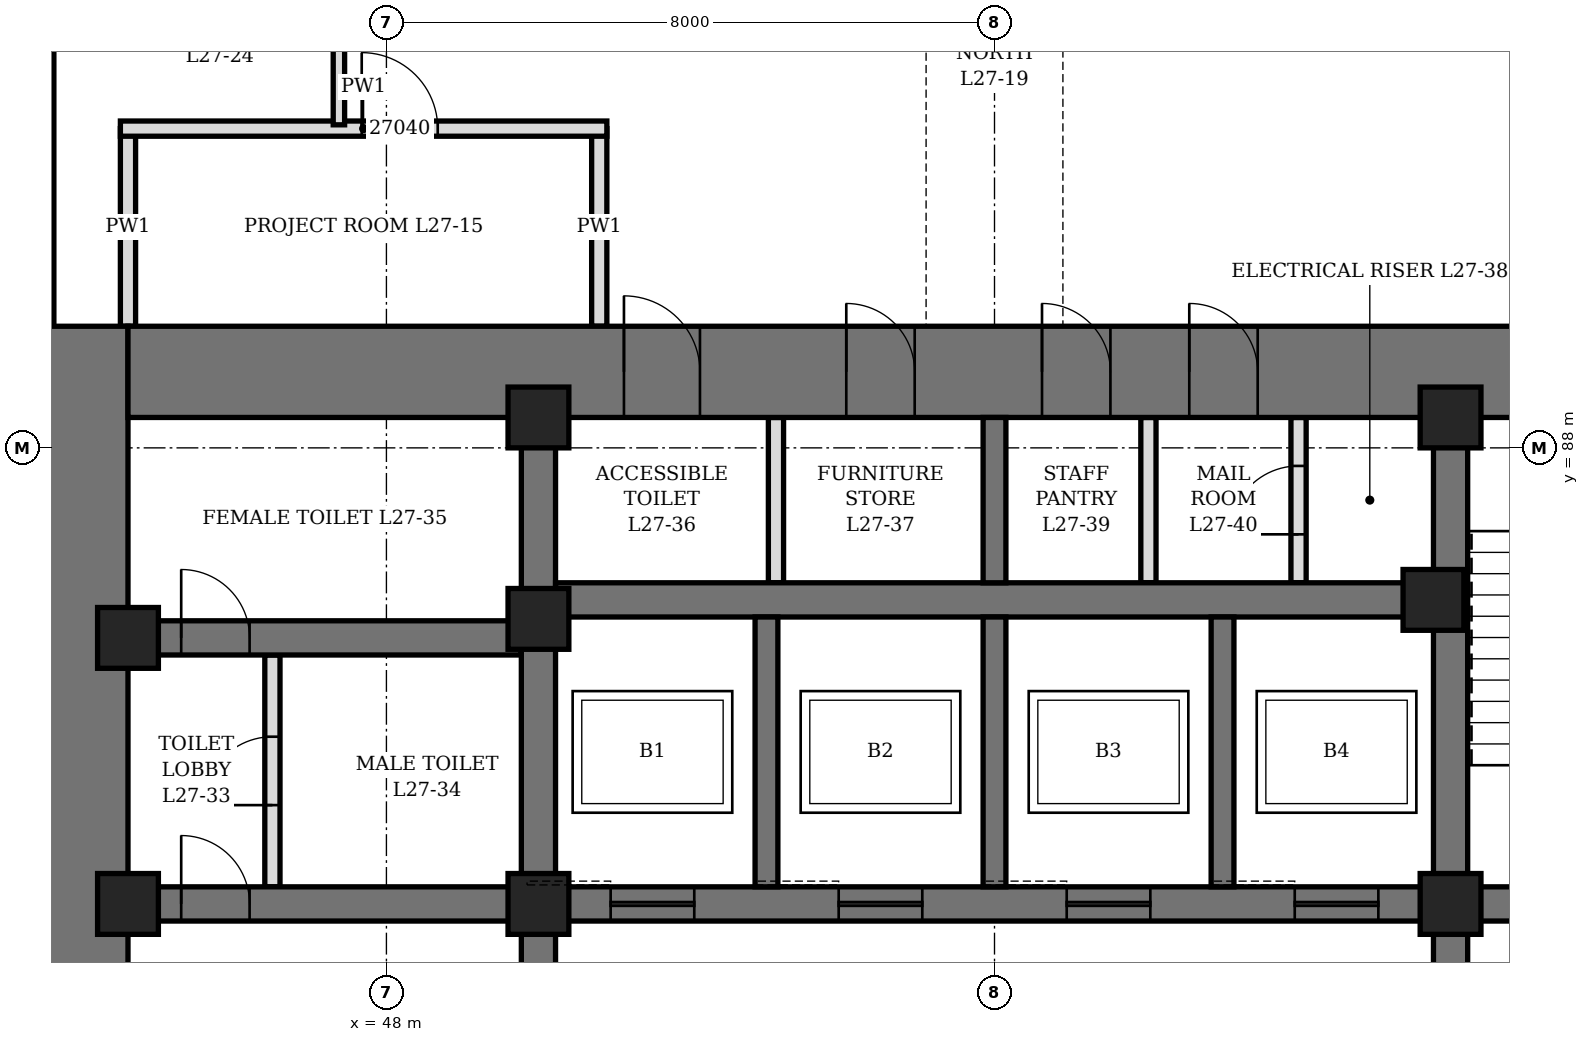
"""IFC4 building model, lengths in metres.
Left out: names, types, materials, properties, quantities, classifications, styles, units other than length and angle.
Written with IfcOpenShell. Run it as: python <this file> out.ifc"""

import sys

from ifc_helpers import new_model, si_unit, direction, frame, frame_2d, origin, origin_2d, place, context, subcontext, project, spatial, rectangle, hollow_rectangle, extrude, element, fill, save


model = new_model("IFC4")
c1 = context("Model", 3, precision=1e-05, world=origin(), true_north=direction((0.0, 1.0)))
c2 = subcontext(c1, "Body", "Model", "MODEL_VIEW")
j1 = project(units=[si_unit("LENGTHUNIT", "METRE"), si_unit("PLANEANGLEUNIT", "RADIAN")], contexts=[c1])
p1 = place(None, origin())
s1 = spatial("IfcSite", under=j1, at=p1, CompositionType="ELEMENT")
p2 = place(p1, origin())
s2 = spatial("IfcBuilding", under=s1, at=p2, CompositionType="ELEMENT")
p3 = place(p2, frame((0.0, 0.0, 124.9)))
s3 = spatial("IfcBuildingStorey", under=s2, at=p3, CompositionType="ELEMENT", Elevation=124.9)
p4 = place(p3, frame((44.0, 70.4, 0.0), z_axis=(0.0, 0.0, 1.0), x_axis=(0.0, 1.0, 0.0)))
e1 = element("IfcWall", 1, at=p4, inside=s3, PredefinedType="SHEAR", context=c2, shape_type="SweptSolid", body=[
    extrude(rectangle(XDim=19.2, YDim=1.2, at=frame_2d((9.6, 0.0))), origin(), (0.0, 0.0, 1.0), 4.2),
])
p5 = place(p4, frame((8.6, 0.0, 0.0)))
e2 = element("IfcOpeningElement", 2, at=p5, cuts=e1, PredefinedType="OPENING", context=c2, shape_type="SweptSolid", body=[
    extrude(rectangle(XDim=2.0, YDim=2.4, at=frame_2d((1.0, 1.2))), frame((0.0, 0.61, 0.0), z_axis=(0.0, -1.0, 0.0), x_axis=(1.0, 0.0, 0.0)), (0.0, 0.0, 1.0), 1.22),
])
p6 = place(p3, frame((44.6, 89.0, 0.0), z_axis=(0.0, 0.0, 1.0), x_axis=(1.0, 0.0, 0.0)))
e3 = element("IfcWall", 3, at=p6, inside=s3, PredefinedType="SHEAR", context=c2, shape_type="SweptSolid", body=[
    extrude(rectangle(XDim=22.8, YDim=1.2, at=frame_2d((11.4, 0.0))), origin(), (0.0, 0.0, 1.0), 4.2),
])
p7 = place(p6, frame((6.525, 0.0, 0.0)))
e4 = element("IfcOpeningElement", 4, at=p7, cuts=e3, PredefinedType="OPENING", context=c2, shape_type="SweptSolid", body=[
    extrude(rectangle(XDim=1.0, YDim=2.1, at=frame_2d((0.5, 1.05))), frame((0.0, 0.61, 0.0), z_axis=(0.0, -1.0, 0.0), x_axis=(1.0, 0.0, 0.0)), (0.0, 0.0, 1.0), 1.22),
])
p8 = place(p6, frame((9.45, 0.0, 0.0)))
e5 = element("IfcOpeningElement", 5, at=p8, cuts=e3, PredefinedType="OPENING", context=c2, shape_type="SweptSolid", body=[
    extrude(rectangle(XDim=0.9, YDim=2.1, at=frame_2d((0.45, 1.05))), frame((0.0, 0.61, 0.0), z_axis=(0.0, -1.0, 0.0), x_axis=(1.0, 0.0, 0.0)), (0.0, 0.0, 1.0), 1.22),
])
p9 = place(p6, frame((12.025, 0.0, 0.0)))
e6 = element("IfcOpeningElement", 6, at=p9, cuts=e3, PredefinedType="OPENING", context=c2, shape_type="SweptSolid", body=[
    extrude(rectangle(XDim=0.9, YDim=2.1, at=frame_2d((0.45, 1.05))), frame((0.0, 0.61, 0.0), z_axis=(0.0, -1.0, 0.0), x_axis=(1.0, 0.0, 0.0)), (0.0, 0.0, 1.0), 1.22),
])
p10 = place(p6, frame((13.962, 0.0, 0.0)))
e7 = element("IfcOpeningElement", 7, at=p10, cuts=e3, PredefinedType="OPENING", context=c2, shape_type="SweptSolid", body=[
    extrude(rectangle(XDim=0.9, YDim=2.1, at=frame_2d((0.45, 1.05))), frame((0.0, 0.61, 0.0), z_axis=(0.0, -1.0, 0.0), x_axis=(1.0, 0.0, 0.0)), (0.0, 0.0, 1.0), 1.22),
])
p11 = place(p3, frame((50.0, 71.6, 0.0), z_axis=(0.0, 0.0, 1.0), x_axis=(0.0, 1.0, 0.0)))
e8 = element("IfcWall", 8, at=p11, inside=s3, PredefinedType="SHEAR", context=c2, shape_type="SweptSolid", body=[
    extrude(rectangle(XDim=16.8, YDim=0.45, at=frame_2d((8.4, 0.0))), origin(), (0.0, 0.0, 1.0), 4.2),
])
p12 = place(p11, frame((7.5, 0.0, 0.0)))
e9 = element("IfcOpeningElement", 9, at=p12, cuts=e8, PredefinedType="OPENING", context=c2, shape_type="SweptSolid", body=[
    extrude(rectangle(XDim=1.8, YDim=2.4, at=frame_2d((0.9, 1.2))), frame((0.0, 0.235, 0.0), z_axis=(0.0, -1.0, 0.0), x_axis=(1.0, 0.0, 0.0)), (0.0, 0.0, 1.0), 0.47),
])
p13 = place(p3, frame((62.0, 71.6, 0.0), z_axis=(0.0, 0.0, 1.0), x_axis=(0.0, 1.0, 0.0)))
e10 = element("IfcWall", 10, at=p13, inside=s3, PredefinedType="SHEAR", context=c2, shape_type="SweptSolid", body=[
    extrude(rectangle(XDim=16.8, YDim=0.45, at=frame_2d((8.4, 0.0))), origin(), (0.0, 0.0, 1.0), 4.2),
])
p14 = place(p13, frame((7.5, 0.0, 0.0)))
e11 = element("IfcOpeningElement", 11, at=p14, cuts=e10, PredefinedType="OPENING", context=c2, shape_type="SweptSolid", body=[
    extrude(rectangle(XDim=1.8, YDim=2.4, at=frame_2d((0.9, 1.2))), frame((0.0, 0.235, 0.0), z_axis=(0.0, -1.0, 0.0), x_axis=(1.0, 0.0, 0.0)), (0.0, 0.0, 1.0), 0.47),
])
p15 = place(p3, frame((44.6, 82.0, 0.0), z_axis=(0.0, 0.0, 1.0), x_axis=(1.0, 0.0, 0.0)))
e12 = element("IfcWall", 12, at=p15, inside=s3, PredefinedType="SHEAR", context=c2, shape_type="SweptSolid", body=[
    extrude(rectangle(XDim=5.175, YDim=0.45, at=frame_2d((2.587, 0.0))), origin(), (0.0, 0.0, 1.0), 4.2),
])
p16 = place(p15, frame((0.7, 0.0, 0.0)))
e13 = element("IfcOpeningElement", 13, at=p16, cuts=e12, PredefinedType="OPENING", context=c2, shape_type="SweptSolid", body=[
    extrude(rectangle(XDim=0.9, YDim=2.1, at=frame_2d((0.45, 1.05))), frame((0.0, 0.235, 0.0), z_axis=(0.0, -1.0, 0.0), x_axis=(1.0, 0.0, 0.0)), (0.0, 0.0, 1.0), 0.47),
])
p17 = place(p3, frame((44.6, 85.5, 0.0), z_axis=(0.0, 0.0, 1.0), x_axis=(1.0, 0.0, 0.0)))
e14 = element("IfcWall", 14, at=p17, inside=s3, PredefinedType="SHEAR", context=c2, shape_type="SweptSolid", body=[
    extrude(rectangle(XDim=5.175, YDim=0.45, at=frame_2d((2.587, 0.0))), origin(), (0.0, 0.0, 1.0), 4.2),
])
p18 = place(p17, frame((0.7, 0.0, 0.0)))
e15 = element("IfcOpeningElement", 15, at=p18, cuts=e14, PredefinedType="OPENING", context=c2, shape_type="SweptSolid", body=[
    extrude(rectangle(XDim=0.9, YDim=2.1, at=frame_2d((0.45, 1.05))), frame((0.0, 0.235, 0.0), z_axis=(0.0, -1.0, 0.0), x_axis=(1.0, 0.0, 0.0)), (0.0, 0.0, 1.0), 0.47),
])
p19 = place(p3, frame((62.225, 82.0, 0.0), z_axis=(0.0, 0.0, 1.0), x_axis=(1.0, 0.0, 0.0)))
e16 = element("IfcWall", 16, at=p19, inside=s3, PredefinedType="SHEAR", context=c2, shape_type="SweptSolid", body=[
    extrude(rectangle(XDim=5.175, YDim=0.45, at=frame_2d((2.587, 0.0))), origin(), (0.0, 0.0, 1.0), 4.2),
])
p20 = place(p19, frame((2.175, 0.0, 0.0)))
e17 = element("IfcOpeningElement", 17, at=p20, cuts=e16, PredefinedType="OPENING", context=c2, shape_type="SweptSolid", body=[
    extrude(rectangle(XDim=1.2, YDim=2.1, at=frame_2d((0.6, 1.05))), frame((0.0, 0.235, 0.0), z_axis=(0.0, -1.0, 0.0), x_axis=(1.0, 0.0, 0.0)), (0.0, 0.0, 1.0), 0.47),
])
p21 = place(p3, frame((50.225, 82.0, 0.0), z_axis=(0.0, 0.0, 1.0), x_axis=(1.0, 0.0, 0.0)))
e18 = element("IfcWall", 18, at=p21, inside=s3, PredefinedType="SHEAR", context=c2, shape_type="SweptSolid", body=[
    extrude(rectangle(XDim=11.55, YDim=0.45, at=frame_2d((5.775, 0.0))), origin(), (0.0, 0.0, 1.0), 4.2),
])
p22 = place(p21, frame((0.725, 0.0, 0.0)))
e19 = element("IfcOpeningElement", 19, at=p22, cuts=e18, PredefinedType="OPENING", context=c2, shape_type="SweptSolid", body=[
    extrude(rectangle(XDim=1.1, YDim=2.2, at=frame_2d((0.55, 1.1))), frame((0.0, 0.235, 0.0), z_axis=(0.0, -1.0, 0.0), x_axis=(1.0, 0.0, 0.0)), (0.0, 0.0, 1.0), 0.47),
])
p23 = place(p21, frame((3.725, 0.0, 0.0)))
e20 = element("IfcOpeningElement", 20, at=p23, cuts=e18, PredefinedType="OPENING", context=c2, shape_type="SweptSolid", body=[
    extrude(rectangle(XDim=1.1, YDim=2.2, at=frame_2d((0.55, 1.1))), frame((0.0, 0.235, 0.0), z_axis=(0.0, -1.0, 0.0), x_axis=(1.0, 0.0, 0.0)), (0.0, 0.0, 1.0), 0.47),
])
p24 = place(p21, frame((6.725, 0.0, 0.0)))
e21 = element("IfcOpeningElement", 21, at=p24, cuts=e18, PredefinedType="OPENING", context=c2, shape_type="SweptSolid", body=[
    extrude(rectangle(XDim=1.1, YDim=2.2, at=frame_2d((0.55, 1.1))), frame((0.0, 0.235, 0.0), z_axis=(0.0, -1.0, 0.0), x_axis=(1.0, 0.0, 0.0)), (0.0, 0.0, 1.0), 0.47),
])
p25 = place(p21, frame((9.725, 0.0, 0.0)))
e22 = element("IfcOpeningElement", 22, at=p25, cuts=e18, PredefinedType="OPENING", context=c2, shape_type="SweptSolid", body=[
    extrude(rectangle(XDim=1.1, YDim=2.2, at=frame_2d((0.55, 1.1))), frame((0.0, 0.235, 0.0), z_axis=(0.0, -1.0, 0.0), x_axis=(1.0, 0.0, 0.0)), (0.0, 0.0, 1.0), 0.47),
])
p26 = place(p3, frame((50.225, 86.0, 0.0), z_axis=(0.0, 0.0, 1.0), x_axis=(1.0, 0.0, 0.0)))
e23 = element("IfcWall", 23, at=p26, inside=s3, PredefinedType="SHEAR", context=c2, shape_type="SweptSolid", body=[
    extrude(rectangle(XDim=11.55, YDim=0.45, at=frame_2d((5.775, 0.0))), origin(), (0.0, 0.0, 1.0), 4.2),
])
for number, where, z_axis, x_axis in (
    (24, (53.0, 82.225, 0.0), (0.0, 0.0, 1.0), (0.0, 1.0, 0.0)),
    (25, (56.0, 82.225, 0.0), (0.0, 0.0, 1.0), (0.0, 1.0, 0.0)),
    (26, (59.0, 82.225, 0.0), (0.0, 0.0, 1.0), (0.0, 1.0, 0.0)),
):
    element("IfcWall", number, at=place(p3, frame(where, z_axis=z_axis, x_axis=x_axis)), inside=s3, PredefinedType="SHEAR", context=c2, shape_type="SweptSolid", body=[
        extrude(rectangle(XDim=3.55, YDim=0.3, at=frame_2d((1.775, 0.0))), origin(), (0.0, 0.0, 1.0), 4.2),
    ])
p27 = place(p3, frame((56.0, 86.225, 0.0), z_axis=(0.0, 0.0, 1.0), x_axis=(0.0, 1.0, 0.0)))
e27 = element("IfcWall", 27, at=p27, inside=s3, PredefinedType="SHEAR", context=c2, shape_type="SweptSolid", body=[
    extrude(rectangle(XDim=2.175, YDim=0.3, at=frame_2d((1.087, 0.0))), origin(), (0.0, 0.0, 1.0), 4.2),
])
for number, where, z_axis, x_axis in (
    (28, (44.6, 82.0, 0.0), (0.0, 0.0, 1.0), (1.0, 0.0, 0.0)),
    (29, (44.6, 85.5, 0.0), (0.0, 0.0, 1.0), (1.0, 0.0, 0.0)),
    (30, (50.0, 82.0, 0.0), (0.0, 0.0, 1.0), (1.0, 0.0, 0.0)),
    (31, (50.0, 85.75, 0.0), (0.0, 0.0, 1.0), (1.0, 0.0, 0.0)),
    (32, (50.0, 88.4, 0.0), (0.0, 0.0, 1.0), (1.0, 0.0, 0.0)),
    (33, (61.775, 86.0, 0.0), (0.0, 0.0, 1.0), (1.0, 0.0, 0.0)),
    (34, (62.0, 82.0, 0.0), (0.0, 0.0, 1.0), (1.0, 0.0, 0.0)),
    (35, (62.0, 88.4, 0.0), (0.0, 0.0, 1.0), (1.0, 0.0, 0.0)),
):
    element("IfcColumn", number, at=place(p3, frame(where, z_axis=z_axis, x_axis=x_axis)), inside=s3, PredefinedType="COLUMN", context=c2, shape_type="SweptSolid", body=[
        extrude(hollow_rectangle(XDim=0.8, YDim=0.8, WallThickness=0.1, at=origin_2d()), origin(), (0.0, 0.0, 1.0), 4.2),
    ])
p28 = place(p3, frame((46.5, 82.225, 0.0), z_axis=(0.0, 0.0, 1.0), x_axis=(0.0, 1.0, 0.0)))
e36 = element("IfcWall", 36, at=p28, inside=s3, PredefinedType="PARTITIONING", context=c2, shape_type="SweptSolid", body=[
    extrude(rectangle(XDim=3.05, YDim=0.2, at=frame_2d((1.525, 0.0))), origin(), (0.0, 0.0, 1.0), 4.04),
])
p29 = place(p28, frame((1.075, 0.0, 0.0)))
e37 = element("IfcOpeningElement", 37, at=p29, cuts=e36, PredefinedType="OPENING", context=c2, shape_type="SweptSolid", body=[
    extrude(rectangle(XDim=0.9, YDim=2.1, at=frame_2d((0.45, 1.05))), frame((0.0, 0.11, 0.0), z_axis=(0.0, -1.0, 0.0), x_axis=(1.0, 0.0, 0.0)), (0.0, 0.0, 1.0), 0.22),
])
p30 = place(p3, frame((53.125, 86.225, 0.0), z_axis=(0.0, 0.0, 1.0), x_axis=(0.0, 1.0, 0.0)))
e38 = element("IfcWall", 38, at=p30, inside=s3, PredefinedType="PARTITIONING", context=c2, shape_type="SweptSolid", body=[
    extrude(rectangle(XDim=2.175, YDim=0.2, at=frame_2d((1.087, 0.0))), origin(), (0.0, 0.0, 1.0), 3.14),
])
p31 = place(p3, frame((60.0, 86.225, 0.0), z_axis=(0.0, 0.0, 1.0), x_axis=(0.0, 1.0, 0.0)))
e39 = element("IfcWall", 39, at=p31, inside=s3, PredefinedType="PARTITIONING", context=c2, shape_type="SweptSolid", body=[
    extrude(rectangle(XDim=2.175, YDim=0.2, at=frame_2d((1.087, 0.0))), origin(), (0.0, 0.0, 1.0), 4.04),
])
p32 = place(p31, frame((0.637, 0.0, 0.0)))
e40 = element("IfcOpeningElement", 40, at=p32, cuts=e39, PredefinedType="OPENING", context=c2, shape_type="SweptSolid", body=[
    extrude(rectangle(XDim=0.9, YDim=2.1, at=frame_2d((0.45, 1.05))), frame((0.0, 0.11, 0.0), z_axis=(0.0, -1.0, 0.0), x_axis=(1.0, 0.0, 0.0)), (0.0, 0.0, 1.0), 0.22),
])
p33 = place(p3, frame((58.025, 86.225, 0.0), z_axis=(0.0, 0.0, 1.0), x_axis=(0.0, 1.0, 0.0)))
e41 = element("IfcWall", 41, at=p33, inside=s3, PredefinedType="PARTITIONING", context=c2, shape_type="SweptSolid", body=[
    extrude(rectangle(XDim=2.175, YDim=0.2, at=frame_2d((1.087, 0.0))), origin(), (0.0, 0.0, 1.0), 4.04),
])
p34 = place(p3, frame((44.6, 89.6, 0.0), z_axis=(0.0, 0.0, 1.0), x_axis=(0.0, 1.0, 0.0)))
e42 = element("IfcWall", 42, at=p34, inside=s3, PredefinedType="PARTITIONING", context=c2, shape_type="SweptSolid", body=[
    extrude(rectangle(XDim=2.6, YDim=0.2, at=frame_2d((1.3, 0.0))), origin(), (0.0, 0.0, 1.0), 2.74),
])
p35 = place(p3, frame((50.8, 89.6, 0.0), z_axis=(0.0, 0.0, 1.0), x_axis=(0.0, 1.0, 0.0)))
e43 = element("IfcWall", 43, at=p35, inside=s3, PredefinedType="PARTITIONING", context=c2, shape_type="SweptSolid", body=[
    extrude(rectangle(XDim=2.6, YDim=0.2, at=frame_2d((1.3, 0.0))), origin(), (0.0, 0.0, 1.0), 4.04),
])
p36 = place(p3, frame((44.5, 92.2, 0.0), z_axis=(0.0, 0.0, 1.0), x_axis=(1.0, 0.0, 0.0)))
e44 = element("IfcWall", 44, at=p36, inside=s3, PredefinedType="PARTITIONING", context=c2, shape_type="SweptSolid", body=[
    extrude(rectangle(XDim=6.4, YDim=0.2, at=frame_2d((3.2, 0.0))), origin(), (0.0, 0.0, 1.0), 4.04),
])
p37 = place(p36, frame((3.175, 0.0, 0.0)))
e45 = element("IfcOpeningElement", 45, at=p37, cuts=e44, PredefinedType="OPENING", context=c2, shape_type="SweptSolid", body=[
    extrude(rectangle(XDim=1.0, YDim=2.1, at=frame_2d((0.5, 1.05))), frame((0.0, 0.11, 0.0), z_axis=(0.0, -1.0, 0.0), x_axis=(1.0, 0.0, 0.0)), (0.0, 0.0, 1.0), 0.22),
])
p38 = place(p3, frame((43.55, 89.6, 0.0), z_axis=(0.0, 0.0, 1.0), x_axis=(0.0, 1.0, 0.0)))
e46 = element("IfcWall", 46, at=p38, inside=s3, PredefinedType="PARTITIONING", context=c2, shape_type="SweptSolid", body=[
    extrude(rectangle(XDim=7.6, YDim=0.15, at=frame_2d((3.8, 0.0))), origin(), (0.0, 0.0, 1.0), 4.04),
])
p39 = place(p38, frame((3.3, 0.0, 0.0)))
e47 = element("IfcOpeningElement", 47, at=p39, cuts=e46, PredefinedType="OPENING", context=c2, shape_type="SweptSolid", body=[
    extrude(rectangle(XDim=1.0, YDim=2.4, at=frame_2d((0.5, 1.2))), frame((0.0, 0.085, 0.0), z_axis=(0.0, -1.0, 0.0), x_axis=(1.0, 0.0, 0.0)), (0.0, 0.0, 1.0), 0.17),
])
p40 = place(p3, frame((47.375, 92.25, 0.0), z_axis=(0.0, 0.0, 1.0), x_axis=(0.0, 1.0, 0.0)))
e48 = element("IfcWall", 48, at=p40, inside=s3, PredefinedType="PARTITIONING", context=c2, shape_type="SweptSolid", body=[
    extrude(rectangle(XDim=4.95, YDim=0.15, at=frame_2d((2.475, 0.0))), origin(), (0.0, 0.0, 1.0), 3.278),
])
p41 = place(p40, frame((1.975, 0.0, 0.0)))
e49 = element("IfcOpeningElement", 49, at=p41, cuts=e48, PredefinedType="OPENING", context=c2, shape_type="SweptSolid", body=[
    extrude(rectangle(XDim=1.0, YDim=2.4, at=frame_2d((0.5, 1.2))), frame((0.0, 0.085, 0.0), z_axis=(0.0, -1.0, 0.0), x_axis=(1.0, 0.0, 0.0)), (0.0, 0.0, 1.0), 0.17),
])
p42 = place(p16, origin())
e50 = element("IfcDoor", 50, at=p42, inside=s3, OperationType="SINGLE_SWING_LEFT", PredefinedType="DOOR", context=c2, shape_type="SweptSolid", body=[
    extrude(rectangle(XDim=0.9, YDim=2.1, at=frame_2d((0.45, 1.05))), frame((0.0, 0.225, 0.0), z_axis=(0.0, -1.0, 0.0), x_axis=(1.0, 0.0, 0.0)), (0.0, 0.0, 1.0), 0.449),
])
fill(e13, e50)
p43 = place(p29, origin())
e51 = element("IfcDoor", 51, at=p43, inside=s3, OperationType="SINGLE_SWING_RIGHT", PredefinedType="DOOR", context=c2, shape_type="SweptSolid", body=[
    extrude(rectangle(XDim=0.9, YDim=2.1, at=frame_2d((0.45, 1.05))), frame((0.0, 0.1, 0.0), z_axis=(0.0, -1.0, 0.0), x_axis=(1.0, 0.0, 0.0)), (0.0, 0.0, 1.0), 0.199),
])
fill(e37, e51)
p44 = place(p18, origin())
e52 = element("IfcDoor", 52, at=p44, inside=s3, OperationType="SINGLE_SWING_RIGHT", PredefinedType="DOOR", context=c2, shape_type="SweptSolid", body=[
    extrude(rectangle(XDim=0.9, YDim=2.1, at=frame_2d((0.45, 1.05))), frame((0.0, 0.225, 0.0), z_axis=(0.0, -1.0, 0.0), x_axis=(1.0, 0.0, 0.0)), (0.0, 0.0, 1.0), 0.449),
])
fill(e15, e52)
p45 = place(p7, origin())
e53 = element("IfcDoor", 53, at=p45, inside=s3, OperationType="SINGLE_SWING_LEFT", PredefinedType="DOOR", context=c2, shape_type="SweptSolid", body=[
    extrude(rectangle(XDim=1.0, YDim=2.1, at=frame_2d((0.5, 1.05))), frame((0.0, 0.35, 0.0), z_axis=(0.0, -1.0, 0.0), x_axis=(1.0, 0.0, 0.0)), (0.0, 0.0, 1.0), 0.7),
])
fill(e4, e53)
p46 = place(p8, origin())
e54 = element("IfcDoor", 54, at=p46, inside=s3, OperationType="SINGLE_SWING_LEFT", PredefinedType="DOOR", context=c2, shape_type="SweptSolid", body=[
    extrude(rectangle(XDim=0.9, YDim=2.1, at=frame_2d((0.45, 1.05))), frame((0.0, 0.35, 0.0), z_axis=(0.0, -1.0, 0.0), x_axis=(1.0, 0.0, 0.0)), (0.0, 0.0, 1.0), 0.7),
])
fill(e5, e54)
p47 = place(p9, origin())
e55 = element("IfcDoor", 55, at=p47, inside=s3, OperationType="SINGLE_SWING_LEFT", PredefinedType="DOOR", context=c2, shape_type="SweptSolid", body=[
    extrude(rectangle(XDim=0.9, YDim=2.1, at=frame_2d((0.45, 1.05))), frame((0.0, 0.35, 0.0), z_axis=(0.0, -1.0, 0.0), x_axis=(1.0, 0.0, 0.0)), (0.0, 0.0, 1.0), 0.7),
])
fill(e6, e55)
p48 = place(p10, origin())
e56 = element("IfcDoor", 56, at=p48, inside=s3, OperationType="SINGLE_SWING_LEFT", PredefinedType="DOOR", context=c2, shape_type="SweptSolid", body=[
    extrude(rectangle(XDim=0.9, YDim=2.1, at=frame_2d((0.45, 1.05))), frame((0.0, 0.35, 0.0), z_axis=(0.0, -1.0, 0.0), x_axis=(1.0, 0.0, 0.0)), (0.0, 0.0, 1.0), 0.7),
])
fill(e7, e56)
p49 = place(p32, origin())
e57 = element("IfcDoor", 57, at=p49, inside=s3, OperationType="SINGLE_SWING_LEFT", PredefinedType="DOOR", context=c2, shape_type="SweptSolid", body=[
    extrude(rectangle(XDim=0.9, YDim=2.1, at=frame_2d((0.45, 1.05))), frame((0.0, 0.1, 0.0), z_axis=(0.0, -1.0, 0.0), x_axis=(1.0, 0.0, 0.0)), (0.0, 0.0, 1.0), 0.199),
])
fill(e40, e57)
p50 = place(p22, origin())
e58 = element("IfcDoor", 58, at=p50, inside=s3, OperationType="SLIDING_TO_LEFT", PredefinedType="DOOR", context=c2, shape_type="SweptSolid", body=[
    extrude(rectangle(XDim=1.1, YDim=2.2, at=frame_2d((0.55, 1.1))), frame((0.0, 0.225, 0.0), z_axis=(0.0, -1.0, 0.0), x_axis=(1.0, 0.0, 0.0)), (0.0, 0.0, 1.0), 0.449),
])
fill(e19, e58)
p51 = place(p23, origin())
e59 = element("IfcDoor", 59, at=p51, inside=s3, OperationType="SLIDING_TO_LEFT", PredefinedType="DOOR", context=c2, shape_type="SweptSolid", body=[
    extrude(rectangle(XDim=1.1, YDim=2.2, at=frame_2d((0.55, 1.1))), frame((0.0, 0.225, 0.0), z_axis=(0.0, -1.0, 0.0), x_axis=(1.0, 0.0, 0.0)), (0.0, 0.0, 1.0), 0.449),
])
fill(e20, e59)
p52 = place(p24, origin())
e60 = element("IfcDoor", 60, at=p52, inside=s3, OperationType="SLIDING_TO_LEFT", PredefinedType="DOOR", context=c2, shape_type="SweptSolid", body=[
    extrude(rectangle(XDim=1.1, YDim=2.2, at=frame_2d((0.55, 1.1))), frame((0.0, 0.225, 0.0), z_axis=(0.0, -1.0, 0.0), x_axis=(1.0, 0.0, 0.0)), (0.0, 0.0, 1.0), 0.449),
])
fill(e21, e60)
p53 = place(p25, origin())
e61 = element("IfcDoor", 61, at=p53, inside=s3, OperationType="SLIDING_TO_LEFT", PredefinedType="DOOR", context=c2, shape_type="SweptSolid", body=[
    extrude(rectangle(XDim=1.1, YDim=2.2, at=frame_2d((0.55, 1.1))), frame((0.0, 0.225, 0.0), z_axis=(0.0, -1.0, 0.0), x_axis=(1.0, 0.0, 0.0)), (0.0, 0.0, 1.0), 0.449),
])
fill(e22, e61)
p54 = place(p37, origin())
e62 = element("IfcDoor", 62, at=p54, inside=s3, OperationType="SINGLE_SWING_LEFT", PredefinedType="DOOR", context=c2, shape_type="SweptSolid", body=[
    extrude(rectangle(XDim=1.0, YDim=2.1, at=frame_2d((0.5, 1.05))), frame((0.0, 0.1, 0.0), z_axis=(0.0, -1.0, 0.0), x_axis=(1.0, 0.0, 0.0)), (0.0, 0.0, 1.0), 0.199),
])
fill(e45, e62)
p55 = place(p39, origin())
e63 = element("IfcDoor", 63, at=p55, inside=s3, OperationType="SINGLE_SWING_RIGHT", PredefinedType="DOOR", context=c2, shape_type="SweptSolid", body=[
    extrude(rectangle(XDim=1.0, YDim=2.4, at=frame_2d((0.5, 1.2))), frame((0.0, 0.075, 0.0), z_axis=(0.0, -1.0, 0.0), x_axis=(1.0, 0.0, 0.0)), (0.0, 0.0, 1.0), 0.149),
])
fill(e47, e63)
save(model, sys.argv[1])
